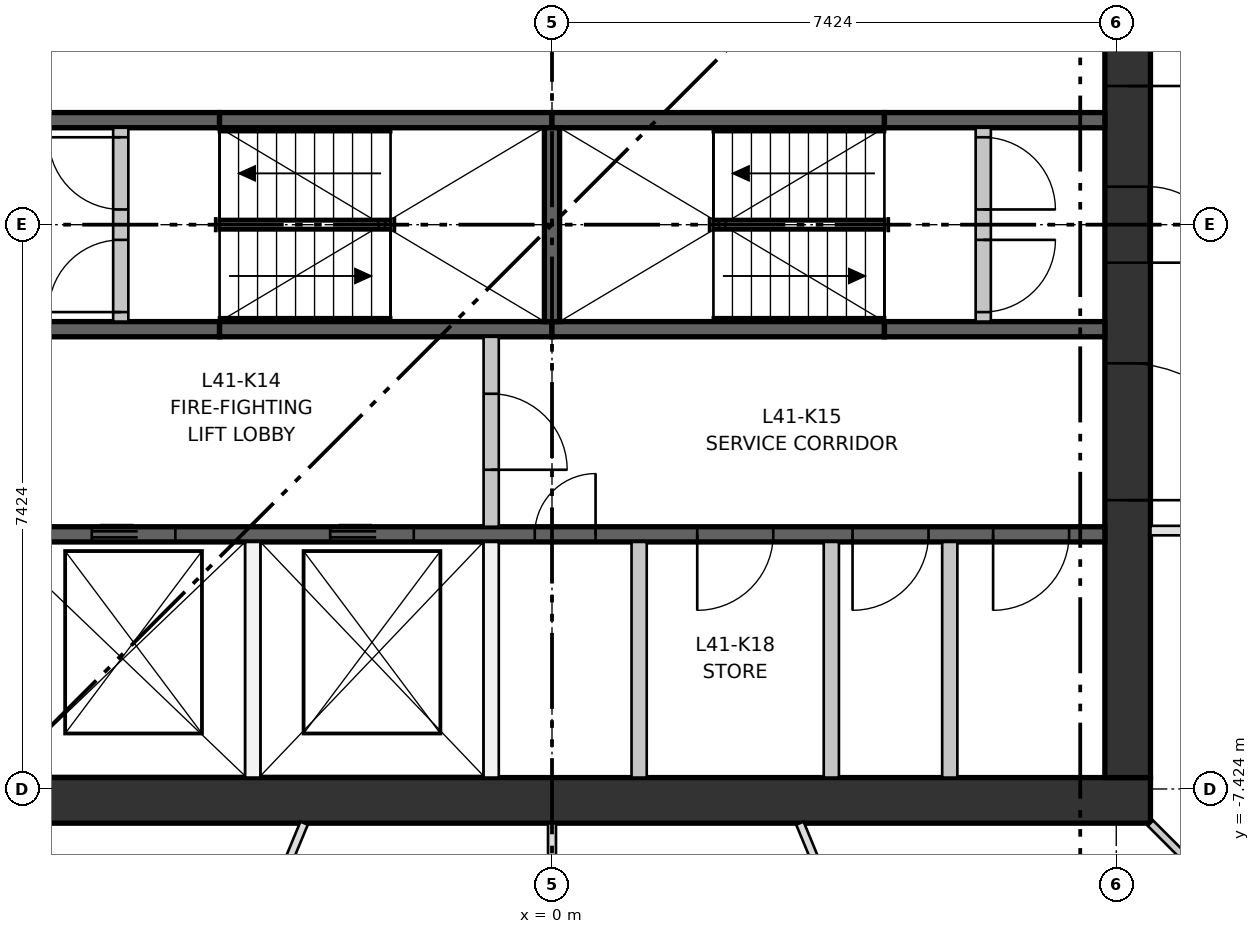
"""IFC4 building model, lengths in metres.
Left out: names, types, materials, properties, quantities, classifications, styles, units other than length and angle.
Written with IfcOpenShell. Run it as: python <this file> out.ifc"""

import sys

from ifc_helpers import new_model, si_unit, direction, frame, frame_2d, origin, place, context, subcontext, project, spatial, rectangle, extrude, element, fill, save


model = new_model("IFC4")
c1 = context("Model", 3, precision=1e-05, world=origin(), true_north=direction((0.0, 1.0)))
c2 = subcontext(c1, "Body", "Model", "MODEL_VIEW")
j1 = project(units=[si_unit("LENGTHUNIT", "METRE"), si_unit("PLANEANGLEUNIT", "RADIAN")], contexts=[c1])
p1 = place(None, origin())
s1 = spatial("IfcSite", under=j1, at=p1, CompositionType="ELEMENT")
p2 = place(p1, origin())
s2 = spatial("IfcBuilding", under=s1, at=p2, CompositionType="ELEMENT")
p3 = place(p2, frame((0.0, 0.0, 154.45)))
s3 = spatial("IfcBuildingStorey", under=s2, at=p3, CompositionType="ELEMENT", Elevation=154.45)
p4 = place(p3, frame((-7.874, -7.574, 0.0), z_axis=(0.0, 0.0, 1.0), x_axis=(1.0, 0.0, 0.0)))
e1 = element("IfcWall", 1, at=p4, inside=s3, PredefinedType="SHEAR", context=c2, shape_type="SweptSolid", body=[
    extrude(rectangle(XDim=15.748, YDim=0.6, at=frame_2d((7.874, 0.0))), origin(), (0.0, 0.0, 1.0), 3.35),
])
p5 = place(p3, frame((7.574, -7.274, 0.0), z_axis=(0.0, 0.0, 1.0), x_axis=(0.0, 1.0, 0.0)))
e2 = element("IfcWall", 2, at=p5, inside=s3, PredefinedType="SHEAR", context=c2, shape_type="SweptSolid", body=[
    extrude(rectangle(XDim=14.548, YDim=0.6, at=frame_2d((7.274, 0.0))), origin(), (0.0, 0.0, 1.0), 3.35),
])
p6 = place(p5, frame((6.774, 0.0, 0.0)))
e3 = element("IfcOpeningElement", 3, at=p6, cuts=e2, PredefinedType="OPENING", context=c2, shape_type="SweptSolid", body=[
    extrude(rectangle(XDim=1.0, YDim=2.1, at=frame_2d((0.5, 1.05))), frame((0.0, 0.31, 0.0), z_axis=(0.0, -1.0, 0.0), x_axis=(1.0, 0.0, 0.0)), (0.0, 0.0, 1.0), 0.62),
])
p7 = place(p5, frame((3.649, 0.0, 0.0)))
e4 = element("IfcOpeningElement", 4, at=p7, cuts=e2, PredefinedType="OPENING", context=c2, shape_type="SweptSolid", body=[
    extrude(rectangle(XDim=1.8, YDim=2.1, at=frame_2d((0.9, 1.05))), frame((0.0, 0.31, 0.0), z_axis=(0.0, -1.0, 0.0), x_axis=(1.0, 0.0, 0.0)), (0.0, 0.0, 1.0), 0.62),
])
p8 = place(p5, frame((9.098, 0.0, 0.0)))
e5 = element("IfcOpeningElement", 5, at=p8, cuts=e2, PredefinedType="OPENING", context=c2, shape_type="SweptSolid", body=[
    extrude(rectangle(XDim=1.8, YDim=2.1, at=frame_2d((0.9, 1.05))), frame((0.0, 0.31, 0.0), z_axis=(0.0, -1.0, 0.0), x_axis=(1.0, 0.0, 0.0)), (0.0, 0.0, 1.0), 0.62),
])
p9 = place(p3, frame((-7.274, -4.074, 0.0), z_axis=(0.0, 0.0, 1.0), x_axis=(1.0, 0.0, 0.0)))
e6 = element("IfcWall", 6, at=p9, inside=s3, PredefinedType="SHEAR", context=c2, shape_type="SweptSolid", body=[
    extrude(rectangle(XDim=14.548, YDim=0.2, at=frame_2d((7.274, 0.0))), origin(), (0.0, 0.0, 1.0), 3.0),
])
p10 = place(p9, frame((1.219, 0.0, 0.0)))
e7 = element("IfcOpeningElement", 7, at=p10, cuts=e6, PredefinedType="OPENING", context=c2, shape_type="SweptSolid", body=[
    extrude(rectangle(XDim=1.1, YDim=2.1, at=frame_2d((0.55, 1.05))), frame((0.0, 0.11, 0.0), z_axis=(0.0, -1.0, 0.0), x_axis=(1.0, 0.0, 0.0)), (0.0, 0.0, 1.0), 0.22),
])
p11 = place(p9, frame((4.355, 0.0, 0.0)))
e8 = element("IfcOpeningElement", 8, at=p11, cuts=e6, PredefinedType="OPENING", context=c2, shape_type="SweptSolid", body=[
    extrude(rectangle(XDim=1.1, YDim=2.1, at=frame_2d((0.55, 1.05))), frame((0.0, 0.11, 0.0), z_axis=(0.0, -1.0, 0.0), x_axis=(1.0, 0.0, 0.0)), (0.0, 0.0, 1.0), 0.22),
])
p12 = place(p9, frame((7.047, 0.0, 0.0)))
e9 = element("IfcOpeningElement", 9, at=p12, cuts=e6, PredefinedType="OPENING", context=c2, shape_type="SweptSolid", body=[
    extrude(rectangle(XDim=0.8, YDim=2.1, at=frame_2d((0.4, 1.05))), frame((0.0, 0.11, 0.0), z_axis=(0.0, -1.0, 0.0), x_axis=(1.0, 0.0, 0.0)), (0.0, 0.0, 1.0), 0.22),
])
p13 = place(p9, frame((9.185, 0.0, 0.0)))
e10 = element("IfcOpeningElement", 10, at=p13, cuts=e6, PredefinedType="OPENING", context=c2, shape_type="SweptSolid", body=[
    extrude(rectangle(XDim=1.0, YDim=2.1, at=frame_2d((0.5, 1.05))), frame((0.0, 0.11, 0.0), z_axis=(0.0, -1.0, 0.0), x_axis=(1.0, 0.0, 0.0)), (0.0, 0.0, 1.0), 0.22),
])
p14 = place(p9, frame((11.228, 0.0, 0.0)))
e11 = element("IfcOpeningElement", 11, at=p14, cuts=e6, PredefinedType="OPENING", context=c2, shape_type="SweptSolid", body=[
    extrude(rectangle(XDim=1.0, YDim=2.1, at=frame_2d((0.5, 1.05))), frame((0.0, 0.11, 0.0), z_axis=(0.0, -1.0, 0.0), x_axis=(1.0, 0.0, 0.0)), (0.0, 0.0, 1.0), 0.22),
])
p15 = place(p9, frame((13.078, 0.0, 0.0)))
e12 = element("IfcOpeningElement", 12, at=p15, cuts=e6, PredefinedType="OPENING", context=c2, shape_type="SweptSolid", body=[
    extrude(rectangle(XDim=1.0, YDim=2.1, at=frame_2d((0.5, 1.05))), frame((0.0, 0.11, 0.0), z_axis=(0.0, -1.0, 0.0), x_axis=(1.0, 0.0, 0.0)), (0.0, 0.0, 1.0), 0.22),
])
p16 = place(p3, frame((-7.274, -1.375, 0.0), z_axis=(0.0, 0.0, 1.0), x_axis=(1.0, 0.0, 0.0)))
e13 = element("IfcWall", 13, at=p16, inside=s3, PredefinedType="SHEAR", context=c2, shape_type="SweptSolid", body=[
    extrude(rectangle(XDim=2.9, YDim=0.2, at=frame_2d((1.45, 0.0))), origin(), (0.0, 0.0, 1.0), 3.0),
])
for number, where, z_axis, x_axis in (
    (14, (-4.374, -1.375, 0.0), (0.0, 0.0, 1.0), (1.0, 0.0, 0.0)),
    (15, (0.0, -1.375, 0.0), (0.0, 0.0, 1.0), (1.0, 0.0, 0.0)),
):
    element("IfcWall", number, at=place(p3, frame(where, z_axis=z_axis, x_axis=x_axis)), inside=s3, PredefinedType="SHEAR", context=c2, shape_type="SweptSolid", body=[
        extrude(rectangle(XDim=4.374, YDim=0.2, at=frame_2d((2.187, 0.0))), origin(), (0.0, 0.0, 1.0), 3.0),
    ])
for number, where, z_axis, x_axis in (
    (16, (4.374, -1.375, 0.0), (0.0, 0.0, 1.0), (1.0, 0.0, 0.0)),
    (17, (-7.274, 1.375, 0.0), (0.0, 0.0, 1.0), (1.0, 0.0, 0.0)),
):
    element("IfcWall", number, at=place(p3, frame(where, z_axis=z_axis, x_axis=x_axis)), inside=s3, PredefinedType="SHEAR", context=c2, shape_type="SweptSolid", body=[
        extrude(rectangle(XDim=2.9, YDim=0.2, at=frame_2d((1.45, 0.0))), origin(), (0.0, 0.0, 1.0), 3.0),
    ])
for number, where, z_axis, x_axis in (
    (18, (-4.374, 1.375, 0.0), (0.0, 0.0, 1.0), (1.0, 0.0, 0.0)),
    (19, (0.0, 1.375, 0.0), (0.0, 0.0, 1.0), (1.0, 0.0, 0.0)),
):
    element("IfcWall", number, at=place(p3, frame(where, z_axis=z_axis, x_axis=x_axis)), inside=s3, PredefinedType="SHEAR", context=c2, shape_type="SweptSolid", body=[
        extrude(rectangle(XDim=4.374, YDim=0.2, at=frame_2d((2.187, 0.0))), origin(), (0.0, 0.0, 1.0), 3.0),
    ])
p17 = place(p3, frame((4.374, 1.375, 0.0), z_axis=(0.0, 0.0, 1.0), x_axis=(1.0, 0.0, 0.0)))
e20 = element("IfcWall", 20, at=p17, inside=s3, PredefinedType="SHEAR", context=c2, shape_type="SweptSolid", body=[
    extrude(rectangle(XDim=2.9, YDim=0.2, at=frame_2d((1.45, 0.0))), origin(), (0.0, 0.0, 1.0), 3.0),
])
p18 = place(p3, frame((0.0, -1.275, 0.0), z_axis=(0.0, 0.0, 1.0), x_axis=(0.0, 1.0, 0.0)))
e21 = element("IfcWall", 21, at=p18, inside=s3, PredefinedType="SHEAR", context=c2, shape_type="SweptSolid", body=[
    extrude(rectangle(XDim=2.55, YDim=0.2, at=frame_2d((1.275, 0.0))), origin(), (0.0, 0.0, 1.0), 3.0),
])
for number, where, z_axis, x_axis in (
    (22, (-3.937, -7.274, 0.0), (0.0, 0.0, 1.0), (0.0, 1.0, 0.0)),
    (23, (-0.8, -7.274, 0.0), (0.0, 0.0, 1.0), (0.0, 1.0, 0.0)),
):
    element("IfcWall", number, at=place(p3, frame(where, z_axis=z_axis, x_axis=x_axis)), inside=s3, PredefinedType="PARTITIONING", context=c2, shape_type="SweptSolid", body=[
        extrude(rectangle(XDim=3.1, YDim=0.2, at=frame_2d((1.55, 0.0))), origin(), (0.0, 0.0, 1.0), 3.0),
    ])
p19 = place(p3, frame((-0.8, -3.974, 0.0), z_axis=(0.0, 0.0, 1.0), x_axis=(0.0, 1.0, 0.0)))
e24 = element("IfcWall", 24, at=p19, inside=s3, PredefinedType="PARTITIONING", context=c2, shape_type="SweptSolid", body=[
    extrude(rectangle(XDim=2.499, YDim=0.2, at=frame_2d((1.25, 0.0))), origin(), (0.0, 0.0, 1.0), 3.0),
])
p20 = place(p19, frame((0.75, 0.0, 0.0)))
e25 = element("IfcOpeningElement", 25, at=p20, cuts=e24, PredefinedType="OPENING", context=c2, shape_type="SweptSolid", body=[
    extrude(rectangle(XDim=1.0, YDim=2.1, at=frame_2d((0.5, 1.05))), frame((0.0, 0.11, 0.0), z_axis=(0.0, -1.0, 0.0), x_axis=(1.0, 0.0, 0.0)), (0.0, 0.0, 1.0), 0.22),
])
for number, where, z_axis, x_axis in (
    (26, (1.146, -7.274, 0.0), (0.0, 0.0, 1.0), (0.0, 1.0, 0.0)),
    (27, (3.675, -7.274, 0.0), (0.0, 0.0, 1.0), (0.0, 1.0, 0.0)),
    (28, (5.233, -7.274, 0.0), (0.0, 0.0, 1.0), (0.0, 1.0, 0.0)),
):
    element("IfcWall", number, at=place(p3, frame(where, z_axis=z_axis, x_axis=x_axis)), inside=s3, PredefinedType="PARTITIONING", context=c2, shape_type="SweptSolid", body=[
        extrude(rectangle(XDim=3.1, YDim=0.2, at=frame_2d((1.55, 0.0))), origin(), (0.0, 0.0, 1.0), 3.0),
    ])
p21 = place(p3, frame((-5.674, -1.275, 0.0), z_axis=(0.0, 0.0, 1.0), x_axis=(0.0, 1.0, 0.0)))
e29 = element("IfcWall", 29, at=p21, inside=s3, PredefinedType="PARTITIONING", context=c2, shape_type="SweptSolid", body=[
    extrude(rectangle(XDim=2.55, YDim=0.2, at=frame_2d((1.275, 0.0))), origin(), (0.0, 0.0, 1.0), 3.0),
])
p22 = place(p21, frame((0.125, 0.0, 0.0)))
e30 = element("IfcOpeningElement", 30, at=p22, cuts=e29, PredefinedType="OPENING", context=c2, shape_type="SweptSolid", body=[
    extrude(rectangle(XDim=0.95, YDim=2.1, at=frame_2d((0.475, 1.05))), frame((0.0, 0.11, 0.0), z_axis=(0.0, -1.0, 0.0), x_axis=(1.0, 0.0, 0.0)), (0.0, 0.0, 1.0), 0.22),
])
p23 = place(p21, frame((1.475, 0.0, 0.0)))
e31 = element("IfcOpeningElement", 31, at=p23, cuts=e29, PredefinedType="OPENING", context=c2, shape_type="SweptSolid", body=[
    extrude(rectangle(XDim=0.95, YDim=2.1, at=frame_2d((0.475, 1.05))), frame((0.0, 0.11, 0.0), z_axis=(0.0, -1.0, 0.0), x_axis=(1.0, 0.0, 0.0)), (0.0, 0.0, 1.0), 0.22),
])
p24 = place(p3, frame((5.674, -1.275, 0.0), z_axis=(0.0, 0.0, 1.0), x_axis=(0.0, 1.0, 0.0)))
e32 = element("IfcWall", 32, at=p24, inside=s3, PredefinedType="PARTITIONING", context=c2, shape_type="SweptSolid", body=[
    extrude(rectangle(XDim=2.55, YDim=0.2, at=frame_2d((1.275, 0.0))), origin(), (0.0, 0.0, 1.0), 3.0),
])
p25 = place(p24, frame((0.125, 0.0, 0.0)))
e33 = element("IfcOpeningElement", 33, at=p25, cuts=e32, PredefinedType="OPENING", context=c2, shape_type="SweptSolid", body=[
    extrude(rectangle(XDim=0.95, YDim=2.1, at=frame_2d((0.475, 1.05))), frame((0.0, 0.11, 0.0), z_axis=(0.0, -1.0, 0.0), x_axis=(1.0, 0.0, 0.0)), (0.0, 0.0, 1.0), 0.22),
])
p26 = place(p24, frame((1.475, 0.0, 0.0)))
e34 = element("IfcOpeningElement", 34, at=p26, cuts=e32, PredefinedType="OPENING", context=c2, shape_type="SweptSolid", body=[
    extrude(rectangle(XDim=0.95, YDim=2.1, at=frame_2d((0.475, 1.05))), frame((0.0, 0.11, 0.0), z_axis=(0.0, -1.0, 0.0), x_axis=(1.0, 0.0, 0.0)), (0.0, 0.0, 1.0), 0.22),
])
p27 = place(p3, frame((12.91, -4.024, 0.0), z_axis=(0.0, 0.0, 1.0), x_axis=(-1.0, 0.0, 0.0)))
e35 = element("IfcWall", 35, at=p27, inside=s3, PredefinedType="PARTITIONING", context=c2, shape_type="SweptSolid", body=[
    extrude(rectangle(XDim=5.036, YDim=0.125, at=frame_2d((2.518, 0.0))), origin(), (0.0, 0.0, 1.0), 3.0),
])
p28 = place(p27, frame((2.0, 0.0, 0.0)))
e36 = element("IfcOpeningElement", 36, at=p28, cuts=e35, PredefinedType="OPENING", context=c2, shape_type="SweptSolid", body=[
    extrude(rectangle(XDim=1.0, YDim=2.1, at=frame_2d((0.5, 1.05))), frame((0.0, 0.073, 0.0), z_axis=(0.0, -1.0, 0.0), x_axis=(1.0, 0.0, 0.0)), (0.0, 0.0, 1.0), 0.145),
])
p29 = place(p3, frame((-3.261, -7.874, 0.0), z_axis=(0.0, 0.0, 1.0), x_axis=(-0.38269858238, -0.923873257024, 0.0)))
e37 = element("IfcWall", 37, at=p29, inside=s3, PredefinedType="PARTITIONING", context=c2, shape_type="SweptSolid", body=[
    extrude(rectangle(XDim=4.207, YDim=0.105, at=frame_2d((2.104, 0.0))), origin(), (0.0, 0.0, 1.0), 3.0),
])
p30 = place(p3, frame((0.0, -7.874, 0.0), z_axis=(0.0, 0.0, 1.0), x_axis=(0.0, -1.0, 0.0)))
e38 = element("IfcWall", 38, at=p30, inside=s3, PredefinedType="PARTITIONING", context=c2, shape_type="SweptSolid", body=[
    extrude(rectangle(XDim=4.856, YDim=0.105, at=frame_2d((2.428, 0.0))), origin(), (0.0, 0.0, 1.0), 3.0),
])
p31 = place(p3, frame((4.872, -11.761, 0.0), z_axis=(0.0, 0.0, 1.0), x_axis=(-0.38269858238, 0.923873257024, 0.0)))
e39 = element("IfcWall", 39, at=p31, inside=s3, PredefinedType="PARTITIONING", context=c2, shape_type="SweptSolid", body=[
    extrude(rectangle(XDim=4.207, YDim=0.105, at=frame_2d((2.104, 0.0))), origin(), (0.0, 0.0, 1.0), 3.0),
])
p32 = place(p31, frame((1.6, 0.0, 0.0)))
e40 = element("IfcOpeningElement", 40, at=p32, cuts=e39, PredefinedType="OPENING", context=c2, shape_type="SweptSolid", body=[
    extrude(rectangle(XDim=1.0, YDim=2.1, at=frame_2d((0.5, 1.05))), frame((0.0, 0.062, 0.0), z_axis=(0.0, -1.0, 0.0), x_axis=(1.0, 0.0, 0.0)), (0.0, 0.0, 1.0), 0.125),
])
p33 = place(p3, frame((12.516, -12.516, 0.0), z_axis=(0.0, 0.0, 1.0), x_axis=(-0.707106781187, 0.707106781187, 0.0)))
e41 = element("IfcWall", 41, at=p33, inside=s3, PredefinedType="PARTITIONING", context=c2, shape_type="SweptSolid", body=[
    extrude(rectangle(XDim=6.564, YDim=0.1, at=frame_2d((3.282, 0.0))), origin(), (0.0, 0.0, 1.0), 3.0),
])
p34 = place(p33, frame((3.0, 0.0, 0.0)))
e42 = element("IfcOpeningElement", 42, at=p34, cuts=e41, PredefinedType="OPENING", context=c2, shape_type="SweptSolid", body=[
    extrude(rectangle(XDim=1.0, YDim=2.1, at=frame_2d((0.5, 1.05))), frame((0.0, 0.06, 0.0), z_axis=(0.0, -1.0, 0.0), x_axis=(1.0, 0.0, 0.0)), (0.0, 0.0, 1.0), 0.12),
])
p35 = place(p10, origin())
e43 = element("IfcDoor", 43, at=p35, inside=s3, OperationType="DOUBLE_DOOR_SLIDING", PredefinedType="DOOR", context=c2, shape_type="SweptSolid", body=[
    extrude(rectangle(XDim=1.1, YDim=2.1, at=frame_2d((0.55, 1.05))), frame((0.0, 0.025, 0.0), z_axis=(0.0, -1.0, 0.0), x_axis=(1.0, 0.0, 0.0)), (0.0, 0.0, 1.0), 0.05),
])
fill(e7, e43)
p36 = place(p11, origin())
e44 = element("IfcDoor", 44, at=p36, inside=s3, OperationType="DOUBLE_DOOR_SLIDING", PredefinedType="DOOR", context=c2, shape_type="SweptSolid", body=[
    extrude(rectangle(XDim=1.1, YDim=2.1, at=frame_2d((0.55, 1.05))), frame((0.0, 0.025, 0.0), z_axis=(0.0, -1.0, 0.0), x_axis=(1.0, 0.0, 0.0)), (0.0, 0.0, 1.0), 0.05),
])
fill(e8, e44)
p37 = place(p22, origin())
e45 = element("IfcDoor", 45, at=p37, inside=s3, OperationType="SINGLE_SWING_LEFT", PredefinedType="DOOR", context=c2, shape_type="SweptSolid", body=[
    extrude(rectangle(XDim=0.95, YDim=2.1, at=frame_2d((0.475, 1.05))), frame((0.0, 0.025, 0.0), z_axis=(0.0, -1.0, 0.0), x_axis=(1.0, 0.0, 0.0)), (0.0, 0.0, 1.0), 0.05),
])
fill(e30, e45)
p38 = place(p23, origin())
e46 = element("IfcDoor", 46, at=p38, inside=s3, OperationType="SINGLE_SWING_RIGHT", PredefinedType="DOOR", context=c2, shape_type="SweptSolid", body=[
    extrude(rectangle(XDim=0.95, YDim=2.1, at=frame_2d((0.475, 1.05))), frame((0.0, 0.025, 0.0), z_axis=(0.0, -1.0, 0.0), x_axis=(1.0, 0.0, 0.0)), (0.0, 0.0, 1.0), 0.05),
])
fill(e31, e46)
p39 = place(p25, frame((0.95, 0.0, 0.0), z_axis=(0.0, 0.0, 1.0), x_axis=(-1.0, 0.0, 0.0)))
e47 = element("IfcDoor", 47, at=p39, inside=s3, OperationType="SINGLE_SWING_RIGHT", PredefinedType="DOOR", context=c2, shape_type="SweptSolid", body=[
    extrude(rectangle(XDim=0.95, YDim=2.1, at=frame_2d((0.475, 1.05))), frame((0.0, 0.025, 0.0), z_axis=(0.0, -1.0, 0.0), x_axis=(1.0, 0.0, 0.0)), (0.0, 0.0, 1.0), 0.05),
])
fill(e33, e47)
p40 = place(p26, frame((0.95, 0.0, 0.0), z_axis=(0.0, 0.0, 1.0), x_axis=(-1.0, 0.0, 0.0)))
e48 = element("IfcDoor", 48, at=p40, inside=s3, OperationType="SINGLE_SWING_LEFT", PredefinedType="DOOR", context=c2, shape_type="SweptSolid", body=[
    extrude(rectangle(XDim=0.95, YDim=2.1, at=frame_2d((0.475, 1.05))), frame((0.0, 0.025, 0.0), z_axis=(0.0, -1.0, 0.0), x_axis=(1.0, 0.0, 0.0)), (0.0, 0.0, 1.0), 0.05),
])
fill(e34, e48)
p41 = place(p20, frame((1.0, 0.0, 0.0), z_axis=(0.0, 0.0, 1.0), x_axis=(-1.0, 0.0, 0.0)))
e49 = element("IfcDoor", 49, at=p41, inside=s3, OperationType="SINGLE_SWING_LEFT", PredefinedType="DOOR", context=c2, shape_type="SweptSolid", body=[
    extrude(rectangle(XDim=1.0, YDim=2.1, at=frame_2d((0.5, 1.05))), frame((0.0, 0.025, 0.0), z_axis=(0.0, -1.0, 0.0), x_axis=(1.0, 0.0, 0.0)), (0.0, 0.0, 1.0), 0.05),
])
fill(e25, e49)
p42 = place(p12, origin())
e50 = element("IfcDoor", 50, at=p42, inside=s3, OperationType="SINGLE_SWING_RIGHT", PredefinedType="DOOR", context=c2, shape_type="SweptSolid", body=[
    extrude(rectangle(XDim=0.8, YDim=2.1, at=frame_2d((0.4, 1.05))), frame((0.0, 0.025, 0.0), z_axis=(0.0, -1.0, 0.0), x_axis=(1.0, 0.0, 0.0)), (0.0, 0.0, 1.0), 0.05),
])
fill(e9, e50)
p43 = place(p13, frame((1.0, 0.0, 0.0), z_axis=(0.0, 0.0, 1.0), x_axis=(-1.0, 0.0, 0.0)))
e51 = element("IfcDoor", 51, at=p43, inside=s3, OperationType="SINGLE_SWING_LEFT", PredefinedType="DOOR", context=c2, shape_type="SweptSolid", body=[
    extrude(rectangle(XDim=1.0, YDim=2.1, at=frame_2d((0.5, 1.05))), frame((0.0, 0.025, 0.0), z_axis=(0.0, -1.0, 0.0), x_axis=(1.0, 0.0, 0.0)), (0.0, 0.0, 1.0), 0.05),
])
fill(e10, e51)
p44 = place(p14, frame((1.0, 0.0, 0.0), z_axis=(0.0, 0.0, 1.0), x_axis=(-1.0, 0.0, 0.0)))
e52 = element("IfcDoor", 52, at=p44, inside=s3, OperationType="SINGLE_SWING_LEFT", PredefinedType="DOOR", context=c2, shape_type="SweptSolid", body=[
    extrude(rectangle(XDim=1.0, YDim=2.1, at=frame_2d((0.5, 1.05))), frame((0.0, 0.025, 0.0), z_axis=(0.0, -1.0, 0.0), x_axis=(1.0, 0.0, 0.0)), (0.0, 0.0, 1.0), 0.05),
])
fill(e11, e52)
p45 = place(p15, frame((1.0, 0.0, 0.0), z_axis=(0.0, 0.0, 1.0), x_axis=(-1.0, 0.0, 0.0)))
e53 = element("IfcDoor", 53, at=p45, inside=s3, OperationType="SINGLE_SWING_LEFT", PredefinedType="DOOR", context=c2, shape_type="SweptSolid", body=[
    extrude(rectangle(XDim=1.0, YDim=2.1, at=frame_2d((0.5, 1.05))), frame((0.0, 0.025, 0.0), z_axis=(0.0, -1.0, 0.0), x_axis=(1.0, 0.0, 0.0)), (0.0, 0.0, 1.0), 0.05),
])
fill(e12, e53)
p46 = place(p6, frame((1.0, 0.0, 0.0), z_axis=(0.0, 0.0, 1.0), x_axis=(-1.0, 0.0, 0.0)))
e54 = element("IfcDoor", 54, at=p46, inside=s3, OperationType="SINGLE_SWING_LEFT", PredefinedType="DOOR", context=c2, shape_type="SweptSolid", body=[
    extrude(rectangle(XDim=1.0, YDim=2.1, at=frame_2d((0.5, 1.05))), frame((0.0, 0.3, 0.0), z_axis=(0.0, -1.0, 0.0), x_axis=(1.0, 0.0, 0.0)), (0.0, 0.0, 1.0), 0.05),
])
fill(e3, e54)
p47 = place(p7, frame((1.8, 0.0, 0.0), z_axis=(0.0, 0.0, 1.0), x_axis=(-1.0, 0.0, 0.0)))
e55 = element("IfcDoor", 55, at=p47, inside=s3, OperationType="DOUBLE_DOOR_SINGLE_SWING", PredefinedType="DOOR", context=c2, shape_type="SweptSolid", body=[
    extrude(rectangle(XDim=1.8, YDim=2.1, at=frame_2d((0.9, 1.05))), frame((0.0, 0.025, 0.0), z_axis=(0.0, -1.0, 0.0), x_axis=(1.0, 0.0, 0.0)), (0.0, 0.0, 1.0), 0.05),
])
fill(e4, e55)
p48 = place(p8, frame((1.8, 0.0, 0.0), z_axis=(0.0, 0.0, 1.0), x_axis=(-1.0, 0.0, 0.0)))
e56 = element("IfcDoor", 56, at=p48, inside=s3, OperationType="DOUBLE_DOOR_SINGLE_SWING", PredefinedType="DOOR", context=c2, shape_type="SweptSolid", body=[
    extrude(rectangle(XDim=1.8, YDim=2.1, at=frame_2d((0.9, 1.05))), frame((0.0, 0.025, 0.0), z_axis=(0.0, -1.0, 0.0), x_axis=(1.0, 0.0, 0.0)), (0.0, 0.0, 1.0), 0.05),
])
fill(e5, e56)
save(model, sys.argv[1])
